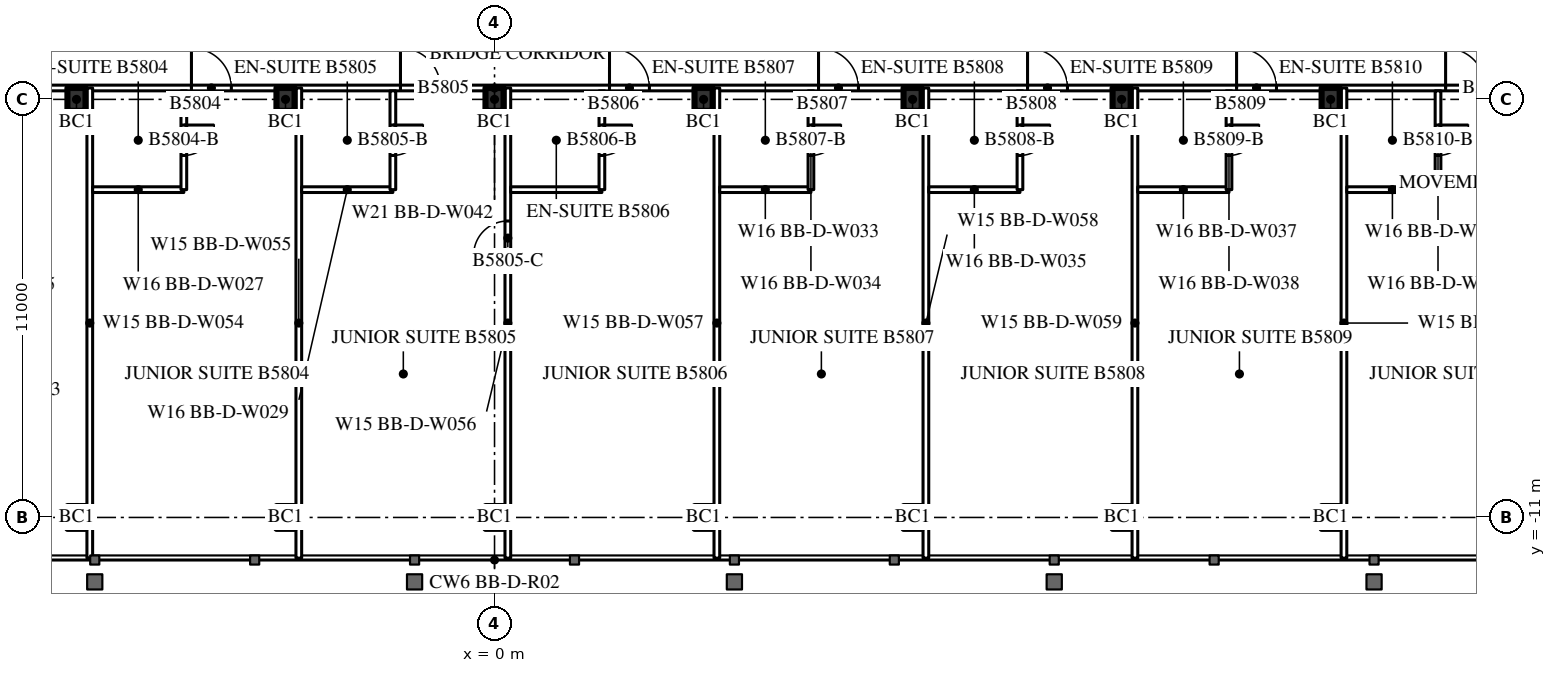
"""IFC4 building model, lengths in metres.
Left out: names, types, materials, properties, quantities, classifications, styles, units other than length and angle.
Written with IfcOpenShell. Run it as: python <this file> out.ifc"""

import sys

from ifc_helpers import new_model, si_unit, direction, frame, frame_2d, origin, origin_2d, place, context, subcontext, project, spatial, rectangle, i_section, extrude, element, fill, save


model = new_model("IFC4")
c1 = context("Model", 3, precision=1e-05, world=origin(), true_north=direction((0.0, 1.0)))
c2 = subcontext(c1, "Body", "Model", "MODEL_VIEW")
j1 = project(units=[si_unit("LENGTHUNIT", "METRE"), si_unit("PLANEANGLEUNIT", "RADIAN")], contexts=[c1])
p1 = place(None, origin())
s1 = spatial("IfcSite", under=j1, at=p1, CompositionType="ELEMENT")
p2 = place(p1, origin())
s2 = spatial("IfcBuilding", under=s1, at=p2, CompositionType="ELEMENT")
p3 = place(p2, frame((0.0, 0.0, 218.9)))
s3 = spatial("IfcBuildingStorey", under=s2, at=p3, CompositionType="ELEMENT", Elevation=218.9)
for number, where, z_axis, x_axis in (
    (1, (-11.0, -11.0, 0.0), (0.0, 0.0, 1.0), (1.0, 0.0, 0.0)),
    (2, (-5.5, -11.0, 0.0), (0.0, 0.0, 1.0), (1.0, 0.0, 0.0)),
    (3, (0.0, -11.0, 0.0), (0.0, 0.0, 1.0), (1.0, 0.0, 0.0)),
    (4, (5.5, -11.0, 0.0), (0.0, 0.0, 1.0), (1.0, 0.0, 0.0)),
    (5, (11.0, -11.0, 0.0), (0.0, 0.0, 1.0), (1.0, 0.0, 0.0)),
    (6, (16.5, -11.0, 0.0), (0.0, 0.0, 1.0), (1.0, 0.0, 0.0)),
    (7, (22.0, -11.0, 0.0), (0.0, 0.0, 1.0), (1.0, 0.0, 0.0)),
    (8, (-11.0, 0.0, 0.0), (0.0, 0.0, 1.0), (1.0, 0.0, 0.0)),
    (9, (-5.5, 0.0, 0.0), (0.0, 0.0, 1.0), (1.0, 0.0, 0.0)),
    (10, (0.0, 0.0, 0.0), (0.0, 0.0, 1.0), (1.0, 0.0, 0.0)),
    (11, (5.5, 0.0, 0.0), (0.0, 0.0, 1.0), (1.0, 0.0, 0.0)),
    (12, (11.0, 0.0, 0.0), (0.0, 0.0, 1.0), (1.0, 0.0, 0.0)),
    (13, (16.5, 0.0, 0.0), (0.0, 0.0, 1.0), (1.0, 0.0, 0.0)),
    (14, (22.0, 0.0, 0.0), (0.0, 0.0, 1.0), (1.0, 0.0, 0.0)),
):
    element("IfcColumn", number, at=place(p3, frame(where, z_axis=z_axis, x_axis=x_axis)), inside=s3, PredefinedType="COLUMN", context=c2, shape_type="SweptSolid", body=[
        extrude(i_section(OverallWidth=0.476, OverallDepth=0.6, WebThickness=0.1, FlangeThickness=0.14, FilletRadius=0.02, at=origin_2d()), origin(), (0.0, 0.0, 1.0), 3.6),
    ])
p4 = place(p3, frame((-27.5, 0.3, 0.0), z_axis=(0.0, 0.0, 1.0), x_axis=(1.0, 0.0, 0.0)))
e15 = element("IfcWall", 15, at=p4, inside=s3, PredefinedType="PARTITIONING", context=c2, shape_type="SweptSolid", body=[
    extrude(rectangle(XDim=55.0, YDim=0.15, at=frame_2d((27.5, 0.0))), origin(), (0.0, 0.0, 1.0), 2.4),
])
p5 = place(p4, frame((1.575, 0.0, 0.0)))
e16 = element("IfcOpeningElement", 16, at=p5, cuts=e15, PredefinedType="OPENING", context=c2, shape_type="SweptSolid", body=[
    extrude(rectangle(XDim=1.0, YDim=2.2, at=frame_2d((0.5, 1.1))), frame((0.0, 0.085, 0.0), z_axis=(0.0, -1.0, 0.0), x_axis=(1.0, 0.0, 0.0)), (0.0, 0.0, 1.0), 0.17),
])
p6 = place(p4, frame((8.525, 0.0, 0.0)))
e17 = element("IfcOpeningElement", 17, at=p6, cuts=e15, PredefinedType="OPENING", context=c2, shape_type="SweptSolid", body=[
    extrude(rectangle(XDim=1.05, YDim=2.4, at=frame_2d((0.525, 1.2))), frame((0.0, 0.085, 0.0), z_axis=(0.0, -1.0, 0.0), x_axis=(1.0, 0.0, 0.0)), (0.0, 0.0, 1.0), 0.17),
])
p7 = place(p4, frame((14.025, 0.0, 0.0)))
e18 = element("IfcOpeningElement", 18, at=p7, cuts=e15, PredefinedType="OPENING", context=c2, shape_type="SweptSolid", body=[
    extrude(rectangle(XDim=1.05, YDim=2.4, at=frame_2d((0.525, 1.2))), frame((0.0, 0.085, 0.0), z_axis=(0.0, -1.0, 0.0), x_axis=(1.0, 0.0, 0.0)), (0.0, 0.0, 1.0), 0.17),
])
p8 = place(p4, frame((19.525, 0.0, 0.0)))
e19 = element("IfcOpeningElement", 19, at=p8, cuts=e15, PredefinedType="OPENING", context=c2, shape_type="SweptSolid", body=[
    extrude(rectangle(XDim=1.05, YDim=2.4, at=frame_2d((0.525, 1.2))), frame((0.0, 0.085, 0.0), z_axis=(0.0, -1.0, 0.0), x_axis=(1.0, 0.0, 0.0)), (0.0, 0.0, 1.0), 0.17),
])
p9 = place(p4, frame((25.025, 0.0, 0.0)))
e20 = element("IfcOpeningElement", 20, at=p9, cuts=e15, PredefinedType="OPENING", context=c2, shape_type="SweptSolid", body=[
    extrude(rectangle(XDim=1.05, YDim=2.4, at=frame_2d((0.525, 1.2))), frame((0.0, 0.085, 0.0), z_axis=(0.0, -1.0, 0.0), x_axis=(1.0, 0.0, 0.0)), (0.0, 0.0, 1.0), 0.17),
])
p10 = place(p4, frame((30.525, 0.0, 0.0)))
e21 = element("IfcOpeningElement", 21, at=p10, cuts=e15, PredefinedType="OPENING", context=c2, shape_type="SweptSolid", body=[
    extrude(rectangle(XDim=1.05, YDim=2.4, at=frame_2d((0.525, 1.2))), frame((0.0, 0.085, 0.0), z_axis=(0.0, -1.0, 0.0), x_axis=(1.0, 0.0, 0.0)), (0.0, 0.0, 1.0), 0.17),
])
p11 = place(p4, frame((36.025, 0.0, 0.0)))
e22 = element("IfcOpeningElement", 22, at=p11, cuts=e15, PredefinedType="OPENING", context=c2, shape_type="SweptSolid", body=[
    extrude(rectangle(XDim=1.05, YDim=2.4, at=frame_2d((0.525, 1.2))), frame((0.0, 0.085, 0.0), z_axis=(0.0, -1.0, 0.0), x_axis=(1.0, 0.0, 0.0)), (0.0, 0.0, 1.0), 0.17),
])
p12 = place(p4, frame((41.525, 0.0, 0.0)))
e23 = element("IfcOpeningElement", 23, at=p12, cuts=e15, PredefinedType="OPENING", context=c2, shape_type="SweptSolid", body=[
    extrude(rectangle(XDim=1.05, YDim=2.4, at=frame_2d((0.525, 1.2))), frame((0.0, 0.085, 0.0), z_axis=(0.0, -1.0, 0.0), x_axis=(1.0, 0.0, 0.0)), (0.0, 0.0, 1.0), 0.17),
])
p13 = place(p4, frame((47.025, 0.0, 0.0)))
e24 = element("IfcOpeningElement", 24, at=p13, cuts=e15, PredefinedType="OPENING", context=c2, shape_type="SweptSolid", body=[
    extrude(rectangle(XDim=1.05, YDim=2.4, at=frame_2d((0.525, 1.2))), frame((0.0, 0.085, 0.0), z_axis=(0.0, -1.0, 0.0), x_axis=(1.0, 0.0, 0.0)), (0.0, 0.0, 1.0), 0.17),
])
p14 = place(p4, frame((52.525, 0.0, 0.0)))
e25 = element("IfcOpeningElement", 25, at=p14, cuts=e15, PredefinedType="OPENING", context=c2, shape_type="SweptSolid", body=[
    extrude(rectangle(XDim=1.05, YDim=2.4, at=frame_2d((0.525, 1.2))), frame((0.0, 0.085, 0.0), z_axis=(0.0, -1.0, 0.0), x_axis=(1.0, 0.0, 0.0)), (0.0, 0.0, 1.0), 0.17),
])
for number, where, z_axis, x_axis in (
    (26, (-10.65, -12.07, 0.0), (0.0, 0.0, 1.0), (0.0, 1.0, 0.0)),
    (27, (-5.15, -12.07, 0.0), (0.0, 0.0, 1.0), (0.0, 1.0, 0.0)),
):
    element("IfcWall", number, at=place(p3, frame(where, z_axis=z_axis, x_axis=x_axis)), inside=s3, PredefinedType="PARTITIONING", context=c2, shape_type="SweptSolid", body=[
        extrude(rectangle(XDim=12.37, YDim=0.15, at=frame_2d((6.185, 0.0))), origin(), (0.0, 0.0, 1.0), 3.4),
    ])
p15 = place(p3, frame((0.35, -12.07, 0.0), z_axis=(0.0, 0.0, 1.0), x_axis=(0.0, 1.0, 0.0)))
e28 = element("IfcWall", 28, at=p15, inside=s3, PredefinedType="PARTITIONING", context=c2, shape_type="SweptSolid", body=[
    extrude(rectangle(XDim=12.37, YDim=0.15, at=frame_2d((6.185, 0.0))), origin(), (0.0, 0.0, 1.0), 3.4),
])
p16 = place(p15, frame((7.97, 0.0, 0.0)))
e29 = element("IfcOpeningElement", 29, at=p16, cuts=e28, PredefinedType="OPENING", context=c2, shape_type="SweptSolid", body=[
    extrude(rectangle(XDim=0.9, YDim=2.2, at=frame_2d((0.45, 1.1))), frame((0.0, 0.085, 0.0), z_axis=(0.0, -1.0, 0.0), x_axis=(1.0, 0.0, 0.0)), (0.0, 0.0, 1.0), 0.17),
])
for number, where, z_axis, x_axis in (
    (30, (5.85, -12.07, 0.0), (0.0, 0.0, 1.0), (0.0, 1.0, 0.0)),
    (31, (11.35, -12.07, 0.0), (0.0, 0.0, 1.0), (0.0, 1.0, 0.0)),
    (32, (16.85, -12.07, 0.0), (0.0, 0.0, 1.0), (0.0, 1.0, 0.0)),
    (33, (22.35, -12.07, 0.0), (0.0, 0.0, 1.0), (0.0, 1.0, 0.0)),
):
    element("IfcWall", number, at=place(p3, frame(where, z_axis=z_axis, x_axis=x_axis)), inside=s3, PredefinedType="PARTITIONING", context=c2, shape_type="SweptSolid", body=[
        extrude(rectangle(XDim=12.37, YDim=0.15, at=frame_2d((6.185, 0.0))), origin(), (0.0, 0.0, 1.0), 3.4),
    ])
p17 = place(p3, frame((-10.575, -2.375, 0.0), z_axis=(0.0, 0.0, 1.0), x_axis=(1.0, 0.0, 0.0)))
e34 = element("IfcWall", 34, at=p17, inside=s3, PredefinedType="PARTITIONING", context=c2, shape_type="SweptSolid", body=[
    extrude(rectangle(XDim=2.4, YDim=0.15, at=frame_2d((1.2, 0.0))), origin(), (0.0, 0.0, 1.0), 3.4),
])
p18 = place(p3, frame((-8.175, -2.375, 0.0), z_axis=(0.0, 0.0, 1.0), x_axis=(0.0, 1.0, 0.0)))
e35 = element("IfcWall", 35, at=p18, inside=s3, PredefinedType="PARTITIONING", context=c2, shape_type="SweptSolid", body=[
    extrude(rectangle(XDim=2.6, YDim=0.15, at=frame_2d((1.3, 0.0))), origin(), (0.0, 0.0, 1.0), 3.4),
])
p19 = place(p18, frame((0.9, 0.0, 0.0)))
e36 = element("IfcOpeningElement", 36, at=p19, cuts=e35, PredefinedType="OPENING", context=c2, shape_type="SweptSolid", body=[
    extrude(rectangle(XDim=0.8, YDim=2.2, at=frame_2d((0.4, 1.1))), frame((0.0, 0.085, 0.0), z_axis=(0.0, -1.0, 0.0), x_axis=(1.0, 0.0, 0.0)), (0.0, 0.0, 1.0), 0.17),
])
p20 = place(p3, frame((-5.075, -2.375, 0.0), z_axis=(0.0, 0.0, 1.0), x_axis=(1.0, 0.0, 0.0)))
e37 = element("IfcWall", 37, at=p20, inside=s3, PredefinedType="PARTITIONING", context=c2, shape_type="SweptSolid", body=[
    extrude(rectangle(XDim=2.4, YDim=0.15, at=frame_2d((1.2, 0.0))), origin(), (0.0, 0.0, 1.0), 3.4),
])
p21 = place(p3, frame((-2.675, -2.375, 0.0), z_axis=(0.0, 0.0, 1.0), x_axis=(0.0, 1.0, 0.0)))
e38 = element("IfcWall", 38, at=p21, inside=s3, PredefinedType="PARTITIONING", context=c2, shape_type="SweptSolid", body=[
    extrude(rectangle(XDim=2.6, YDim=0.15, at=frame_2d((1.3, 0.0))), origin(), (0.0, 0.0, 1.0), 3.4),
])
p22 = place(p21, frame((0.9, 0.0, 0.0)))
e39 = element("IfcOpeningElement", 39, at=p22, cuts=e38, PredefinedType="OPENING", context=c2, shape_type="SweptSolid", body=[
    extrude(rectangle(XDim=0.8, YDim=2.2, at=frame_2d((0.4, 1.1))), frame((0.0, 0.085, 0.0), z_axis=(0.0, -1.0, 0.0), x_axis=(1.0, 0.0, 0.0)), (0.0, 0.0, 1.0), 0.17),
])
p23 = place(p3, frame((0.425, -2.375, 0.0), z_axis=(0.0, 0.0, 1.0), x_axis=(1.0, 0.0, 0.0)))
e40 = element("IfcWall", 40, at=p23, inside=s3, PredefinedType="PARTITIONING", context=c2, shape_type="SweptSolid", body=[
    extrude(rectangle(XDim=2.4, YDim=0.15, at=frame_2d((1.2, 0.0))), origin(), (0.0, 0.0, 1.0), 3.4),
])
p24 = place(p3, frame((2.825, -2.375, 0.0), z_axis=(0.0, 0.0, 1.0), x_axis=(0.0, 1.0, 0.0)))
e41 = element("IfcWall", 41, at=p24, inside=s3, PredefinedType="PARTITIONING", context=c2, shape_type="SweptSolid", body=[
    extrude(rectangle(XDim=2.6, YDim=0.15, at=frame_2d((1.3, 0.0))), origin(), (0.0, 0.0, 1.0), 3.4),
])
p25 = place(p24, frame((0.9, 0.0, 0.0)))
e42 = element("IfcOpeningElement", 42, at=p25, cuts=e41, PredefinedType="OPENING", context=c2, shape_type="SweptSolid", body=[
    extrude(rectangle(XDim=0.8, YDim=2.2, at=frame_2d((0.4, 1.1))), frame((0.0, 0.085, 0.0), z_axis=(0.0, -1.0, 0.0), x_axis=(1.0, 0.0, 0.0)), (0.0, 0.0, 1.0), 0.17),
])
p26 = place(p3, frame((5.925, -2.375, 0.0), z_axis=(0.0, 0.0, 1.0), x_axis=(1.0, 0.0, 0.0)))
e43 = element("IfcWall", 43, at=p26, inside=s3, PredefinedType="PARTITIONING", context=c2, shape_type="SweptSolid", body=[
    extrude(rectangle(XDim=2.4, YDim=0.15, at=frame_2d((1.2, 0.0))), origin(), (0.0, 0.0, 1.0), 3.4),
])
p27 = place(p3, frame((8.325, -2.375, 0.0), z_axis=(0.0, 0.0, 1.0), x_axis=(0.0, 1.0, 0.0)))
e44 = element("IfcWall", 44, at=p27, inside=s3, PredefinedType="PARTITIONING", context=c2, shape_type="SweptSolid", body=[
    extrude(rectangle(XDim=2.6, YDim=0.15, at=frame_2d((1.3, 0.0))), origin(), (0.0, 0.0, 1.0), 3.4),
])
p28 = place(p27, frame((0.9, 0.0, 0.0)))
e45 = element("IfcOpeningElement", 45, at=p28, cuts=e44, PredefinedType="OPENING", context=c2, shape_type="SweptSolid", body=[
    extrude(rectangle(XDim=0.8, YDim=2.2, at=frame_2d((0.4, 1.1))), frame((0.0, 0.085, 0.0), z_axis=(0.0, -1.0, 0.0), x_axis=(1.0, 0.0, 0.0)), (0.0, 0.0, 1.0), 0.17),
])
p29 = place(p3, frame((11.425, -2.375, 0.0), z_axis=(0.0, 0.0, 1.0), x_axis=(1.0, 0.0, 0.0)))
e46 = element("IfcWall", 46, at=p29, inside=s3, PredefinedType="PARTITIONING", context=c2, shape_type="SweptSolid", body=[
    extrude(rectangle(XDim=2.4, YDim=0.15, at=frame_2d((1.2, 0.0))), origin(), (0.0, 0.0, 1.0), 3.4),
])
p30 = place(p3, frame((13.825, -2.375, 0.0), z_axis=(0.0, 0.0, 1.0), x_axis=(0.0, 1.0, 0.0)))
e47 = element("IfcWall", 47, at=p30, inside=s3, PredefinedType="PARTITIONING", context=c2, shape_type="SweptSolid", body=[
    extrude(rectangle(XDim=2.6, YDim=0.15, at=frame_2d((1.3, 0.0))), origin(), (0.0, 0.0, 1.0), 3.4),
])
p31 = place(p30, frame((0.9, 0.0, 0.0)))
e48 = element("IfcOpeningElement", 48, at=p31, cuts=e47, PredefinedType="OPENING", context=c2, shape_type="SweptSolid", body=[
    extrude(rectangle(XDim=0.8, YDim=2.2, at=frame_2d((0.4, 1.1))), frame((0.0, 0.085, 0.0), z_axis=(0.0, -1.0, 0.0), x_axis=(1.0, 0.0, 0.0)), (0.0, 0.0, 1.0), 0.17),
])
p32 = place(p3, frame((16.925, -2.375, 0.0), z_axis=(0.0, 0.0, 1.0), x_axis=(1.0, 0.0, 0.0)))
e49 = element("IfcWall", 49, at=p32, inside=s3, PredefinedType="PARTITIONING", context=c2, shape_type="SweptSolid", body=[
    extrude(rectangle(XDim=2.4, YDim=0.15, at=frame_2d((1.2, 0.0))), origin(), (0.0, 0.0, 1.0), 3.4),
])
p33 = place(p3, frame((19.325, -2.375, 0.0), z_axis=(0.0, 0.0, 1.0), x_axis=(0.0, 1.0, 0.0)))
e50 = element("IfcWall", 50, at=p33, inside=s3, PredefinedType="PARTITIONING", context=c2, shape_type="SweptSolid", body=[
    extrude(rectangle(XDim=2.6, YDim=0.15, at=frame_2d((1.3, 0.0))), origin(), (0.0, 0.0, 1.0), 3.4),
])
p34 = place(p33, frame((0.9, 0.0, 0.0)))
e51 = element("IfcOpeningElement", 51, at=p34, cuts=e50, PredefinedType="OPENING", context=c2, shape_type="SweptSolid", body=[
    extrude(rectangle(XDim=0.8, YDim=2.2, at=frame_2d((0.4, 1.1))), frame((0.0, 0.085, 0.0), z_axis=(0.0, -1.0, 0.0), x_axis=(1.0, 0.0, 0.0)), (0.0, 0.0, 1.0), 0.17),
])
p35 = place(p3, frame((22.425, -2.375, 0.0), z_axis=(0.0, 0.0, 1.0), x_axis=(1.0, 0.0, 0.0)))
e52 = element("IfcWall", 52, at=p35, inside=s3, PredefinedType="PARTITIONING", context=c2, shape_type="SweptSolid", body=[
    extrude(rectangle(XDim=2.4, YDim=0.15, at=frame_2d((1.2, 0.0))), origin(), (0.0, 0.0, 1.0), 3.4),
])
p36 = place(p3, frame((24.825, -2.375, 0.0), z_axis=(0.0, 0.0, 1.0), x_axis=(0.0, 1.0, 0.0)))
e53 = element("IfcWall", 53, at=p36, inside=s3, PredefinedType="PARTITIONING", context=c2, shape_type="SweptSolid", body=[
    extrude(rectangle(XDim=2.6, YDim=0.15, at=frame_2d((1.3, 0.0))), origin(), (0.0, 0.0, 1.0), 3.4),
])
p37 = place(p36, frame((0.9, 0.0, 0.0)))
e54 = element("IfcOpeningElement", 54, at=p37, cuts=e53, PredefinedType="OPENING", context=c2, shape_type="SweptSolid", body=[
    extrude(rectangle(XDim=0.8, YDim=2.2, at=frame_2d((0.4, 1.1))), frame((0.0, 0.085, 0.0), z_axis=(0.0, -1.0, 0.0), x_axis=(1.0, 0.0, 0.0)), (0.0, 0.0, 1.0), 0.17),
])
p38 = place(p19, origin())
e55 = element("IfcDoor", 55, at=p38, inside=s3, OperationType="SINGLE_SWING_RIGHT", PredefinedType="DOOR", context=c2, shape_type="SweptSolid", body=[
    extrude(rectangle(XDim=0.8, YDim=2.2, at=frame_2d((0.4, 1.1))), frame((0.0, 0.025, 0.0), z_axis=(0.0, -1.0, 0.0), x_axis=(1.0, 0.0, 0.0)), (0.0, 0.0, 1.0), 0.05),
])
fill(e36, e55)
p39 = place(p8, origin())
e56 = element("IfcDoor", 56, at=p39, inside=s3, OperationType="SINGLE_SWING_LEFT", PredefinedType="DOOR", context=c2, shape_type="SweptSolid", body=[
    extrude(rectangle(XDim=1.05, YDim=2.4, at=frame_2d((0.525, 1.2))), frame((0.0, 0.025, 0.0), z_axis=(0.0, -1.0, 0.0), x_axis=(1.0, 0.0, 0.0)), (0.0, 0.0, 1.0), 0.05),
])
fill(e19, e56)
p40 = place(p22, origin())
e57 = element("IfcDoor", 57, at=p40, inside=s3, OperationType="SINGLE_SWING_RIGHT", PredefinedType="DOOR", context=c2, shape_type="SweptSolid", body=[
    extrude(rectangle(XDim=0.8, YDim=2.2, at=frame_2d((0.4, 1.1))), frame((0.0, 0.025, 0.0), z_axis=(0.0, -1.0, 0.0), x_axis=(1.0, 0.0, 0.0)), (0.0, 0.0, 1.0), 0.05),
])
fill(e39, e57)
p41 = place(p9, origin())
e58 = element("IfcDoor", 58, at=p41, inside=s3, OperationType="SINGLE_SWING_LEFT", PredefinedType="DOOR", context=c2, shape_type="SweptSolid", body=[
    extrude(rectangle(XDim=1.05, YDim=2.4, at=frame_2d((0.525, 1.2))), frame((0.0, 0.025, 0.0), z_axis=(0.0, -1.0, 0.0), x_axis=(1.0, 0.0, 0.0)), (0.0, 0.0, 1.0), 0.05),
])
fill(e20, e58)
p42 = place(p25, origin())
e59 = element("IfcDoor", 59, at=p42, inside=s3, OperationType="SINGLE_SWING_RIGHT", PredefinedType="DOOR", context=c2, shape_type="SweptSolid", body=[
    extrude(rectangle(XDim=0.8, YDim=2.2, at=frame_2d((0.4, 1.1))), frame((0.0, 0.025, 0.0), z_axis=(0.0, -1.0, 0.0), x_axis=(1.0, 0.0, 0.0)), (0.0, 0.0, 1.0), 0.05),
])
fill(e42, e59)
p43 = place(p10, origin())
e60 = element("IfcDoor", 60, at=p43, inside=s3, OperationType="SINGLE_SWING_LEFT", PredefinedType="DOOR", context=c2, shape_type="SweptSolid", body=[
    extrude(rectangle(XDim=1.05, YDim=2.4, at=frame_2d((0.525, 1.2))), frame((0.0, 0.025, 0.0), z_axis=(0.0, -1.0, 0.0), x_axis=(1.0, 0.0, 0.0)), (0.0, 0.0, 1.0), 0.05),
])
fill(e21, e60)
p44 = place(p28, origin())
e61 = element("IfcDoor", 61, at=p44, inside=s3, OperationType="SINGLE_SWING_RIGHT", PredefinedType="DOOR", context=c2, shape_type="SweptSolid", body=[
    extrude(rectangle(XDim=0.8, YDim=2.2, at=frame_2d((0.4, 1.1))), frame((0.0, 0.025, 0.0), z_axis=(0.0, -1.0, 0.0), x_axis=(1.0, 0.0, 0.0)), (0.0, 0.0, 1.0), 0.05),
])
fill(e45, e61)
p45 = place(p11, origin())
e62 = element("IfcDoor", 62, at=p45, inside=s3, OperationType="SINGLE_SWING_LEFT", PredefinedType="DOOR", context=c2, shape_type="SweptSolid", body=[
    extrude(rectangle(XDim=1.05, YDim=2.4, at=frame_2d((0.525, 1.2))), frame((0.0, 0.025, 0.0), z_axis=(0.0, -1.0, 0.0), x_axis=(1.0, 0.0, 0.0)), (0.0, 0.0, 1.0), 0.05),
])
fill(e22, e62)
p46 = place(p31, origin())
e63 = element("IfcDoor", 63, at=p46, inside=s3, OperationType="SINGLE_SWING_RIGHT", PredefinedType="DOOR", context=c2, shape_type="SweptSolid", body=[
    extrude(rectangle(XDim=0.8, YDim=2.2, at=frame_2d((0.4, 1.1))), frame((0.0, 0.025, 0.0), z_axis=(0.0, -1.0, 0.0), x_axis=(1.0, 0.0, 0.0)), (0.0, 0.0, 1.0), 0.05),
])
fill(e48, e63)
p47 = place(p12, origin())
e64 = element("IfcDoor", 64, at=p47, inside=s3, OperationType="SINGLE_SWING_LEFT", PredefinedType="DOOR", context=c2, shape_type="SweptSolid", body=[
    extrude(rectangle(XDim=1.05, YDim=2.4, at=frame_2d((0.525, 1.2))), frame((0.0, 0.025, 0.0), z_axis=(0.0, -1.0, 0.0), x_axis=(1.0, 0.0, 0.0)), (0.0, 0.0, 1.0), 0.05),
])
fill(e23, e64)
p48 = place(p34, origin())
e65 = element("IfcDoor", 65, at=p48, inside=s3, OperationType="SINGLE_SWING_RIGHT", PredefinedType="DOOR", context=c2, shape_type="SweptSolid", body=[
    extrude(rectangle(XDim=0.8, YDim=2.2, at=frame_2d((0.4, 1.1))), frame((0.0, 0.025, 0.0), z_axis=(0.0, -1.0, 0.0), x_axis=(1.0, 0.0, 0.0)), (0.0, 0.0, 1.0), 0.05),
])
fill(e51, e65)
p49 = place(p13, origin())
e66 = element("IfcDoor", 66, at=p49, inside=s3, OperationType="SINGLE_SWING_LEFT", PredefinedType="DOOR", context=c2, shape_type="SweptSolid", body=[
    extrude(rectangle(XDim=1.05, YDim=2.4, at=frame_2d((0.525, 1.2))), frame((0.0, 0.025, 0.0), z_axis=(0.0, -1.0, 0.0), x_axis=(1.0, 0.0, 0.0)), (0.0, 0.0, 1.0), 0.05),
])
fill(e24, e66)
p50 = place(p37, origin())
e67 = element("IfcDoor", 67, at=p50, inside=s3, OperationType="SINGLE_SWING_RIGHT", PredefinedType="DOOR", context=c2, shape_type="SweptSolid", body=[
    extrude(rectangle(XDim=0.8, YDim=2.2, at=frame_2d((0.4, 1.1))), frame((0.0, 0.025, 0.0), z_axis=(0.0, -1.0, 0.0), x_axis=(1.0, 0.0, 0.0)), (0.0, 0.0, 1.0), 0.05),
])
fill(e54, e67)
p51 = place(p14, origin())
e68 = element("IfcDoor", 68, at=p51, inside=s3, OperationType="SINGLE_SWING_LEFT", PredefinedType="DOOR", context=c2, shape_type="SweptSolid", body=[
    extrude(rectangle(XDim=1.05, YDim=2.4, at=frame_2d((0.525, 1.2))), frame((0.0, 0.025, 0.0), z_axis=(0.0, -1.0, 0.0), x_axis=(1.0, 0.0, 0.0)), (0.0, 0.0, 1.0), 0.05),
])
fill(e25, e68)
p52 = place(p16, origin())
e69 = element("IfcDoor", 69, at=p52, inside=s3, OperationType="SINGLE_SWING_LEFT", PredefinedType="DOOR", context=c2, shape_type="SweptSolid", body=[
    extrude(rectangle(XDim=0.9, YDim=2.2, at=frame_2d((0.45, 1.1))), frame((0.0, 0.025, 0.0), z_axis=(0.0, -1.0, 0.0), x_axis=(1.0, 0.0, 0.0)), (0.0, 0.0, 1.0), 0.05),
])
fill(e29, e69)
save(model, sys.argv[1])
